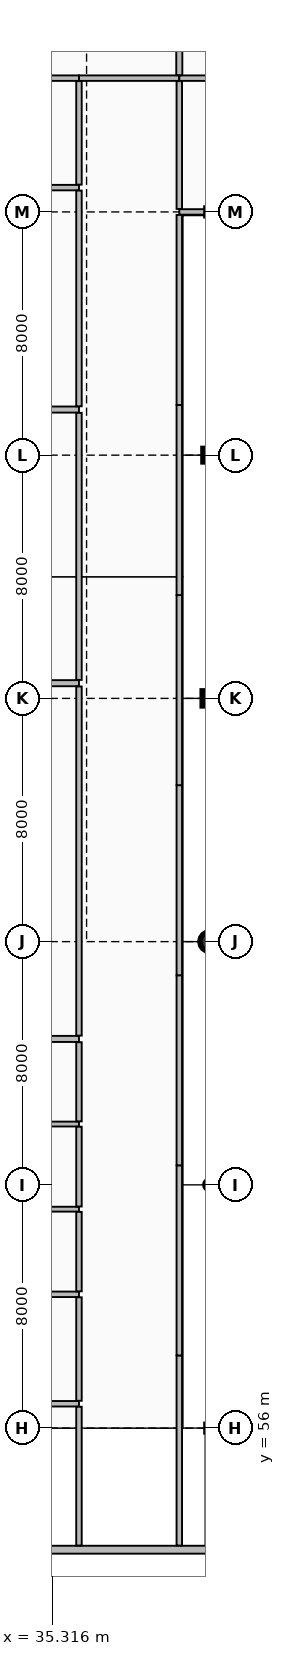
"""IFC4 building model, lengths in metres.
Left out: names, types, materials, properties, quantities, classifications, styles, units other than length and angle.
Written with IfcOpenShell. Run it as: python <this file> out.ifc"""

import sys

from ifc_helpers import new_model, si_unit, direction, frame, frame_2d, origin, origin_2d, place, context, subcontext, project, spatial, rectangle, circle, hollow_circle, extrude, element, fill, save


model = new_model("IFC4")
c1 = context("Model", 3, precision=1e-05, world=origin(), true_north=direction((0.0, 1.0)))
c2 = subcontext(c1, "Body", "Model", "MODEL_VIEW")
j1 = project(units=[si_unit("LENGTHUNIT", "METRE"), si_unit("PLANEANGLEUNIT", "RADIAN")], contexts=[c1])
p1 = place(None, origin())
s1 = spatial("IfcSite", under=j1, at=p1, CompositionType="ELEMENT")
p2 = place(p1, origin())
s2 = spatial("IfcBuilding", under=s1, at=p2, CompositionType="ELEMENT")
p3 = place(p2, frame((0.0, 0.0, 29.1)))
s3 = spatial("IfcBuildingStorey", under=s2, at=p3, CompositionType="ELEMENT", Elevation=29.1)
p4 = place(p3, frame((40.5, 64.0, 0.0), z_axis=(0.0, 0.0, 1.0), x_axis=(1.0, 0.0, 0.0)))
e1 = element("IfcColumn", 1, at=p4, inside=s3, PredefinedType="COLUMN", context=c2, shape_type="SweptSolid", body=[
    extrude(hollow_circle(Radius=0.162, WallThickness=0.013, at=origin_2d()), origin(), (0.0, 0.0, 1.0), 4.2),
])
p5 = place(p3, frame((40.5, 72.0, 0.0), z_axis=(0.0, 0.0, 1.0), x_axis=(1.0, 0.0, 0.0)))
e2 = element("IfcColumn", 2, at=p5, inside=s3, PredefinedType="COLUMN", context=c2, shape_type="SweptSolid", body=[
    extrude(circle(Radius=0.325, at=origin_2d()), origin(), (0.0, 0.0, 1.0), 4.2),
])
p6 = place(p3, frame((40.5, 80.0, 0.0), z_axis=(0.0, 0.0, 1.0), x_axis=(1.0, 0.0, 0.0)))
e3 = element("IfcColumn", 3, at=p6, inside=s3, PredefinedType="COLUMN", context=c2, shape_type="SweptSolid", body=[
    extrude(rectangle(XDim=0.5, YDim=0.5, at=origin_2d()), origin(), (0.0, 0.0, 1.0), 4.2),
])
p7 = place(p3, frame((40.5, 88.0, 0.0), z_axis=(0.0, 0.0, 1.0), x_axis=(1.0, 0.0, 0.0)))
e4 = element("IfcColumn", 4, at=p7, inside=s3, PredefinedType="COLUMN", context=c2, shape_type="SweptSolid", body=[
    extrude(rectangle(XDim=0.45, YDim=0.45, at=origin_2d()), origin(), (0.0, 0.0, 1.0), 4.2),
])
p8 = place(p3, frame((40.5, 52.0, 0.0), z_axis=(0.0, 0.0, 1.0), x_axis=(0.0, 1.0, 0.0)))
e5 = element("IfcWall", 5, at=p8, inside=s3, PredefinedType="SOLIDWALL", context=c2, shape_type="SweptSolid", body=[
    extrude(rectangle(XDim=3.82, YDim=0.28, at=frame_2d((1.91, 0.0))), origin(), (0.0, 0.0, 1.0), 3.96),
])
p9 = place(p3, frame((28.35, 52.0, 0.0), z_axis=(0.0, 0.0, 1.0), x_axis=(1.0, 0.0, 0.0)))
e6 = element("IfcWall", 6, at=p9, inside=s3, PredefinedType="SOLIDWALL", context=c2, shape_type="SweptSolid", body=[
    extrude(rectangle(XDim=12.15, YDim=0.26, at=frame_2d((6.075, 0.0))), origin(), (0.0, 0.0, 1.0), 3.96),
])
p10 = place(p9, frame((5.4, 0.0, 0.85)))
e7 = element("IfcOpeningElement", 7, at=p10, cuts=e6, PredefinedType="OPENING", context=c2, shape_type="SweptSolid", body=[
    extrude(rectangle(XDim=0.9, YDim=2.4, at=frame_2d((0.45, 1.2))), frame((0.0, 0.14, 0.0), z_axis=(0.0, -1.0, 0.0), x_axis=(1.0, 0.0, 0.0)), (0.0, 0.0, 1.0), 0.28),
])
for number, where, z_axis, x_axis in (
    (8, (29.579, 80.5, 0.0), (0.0, 0.0, 1.0), (1.0, 0.0, 0.0)),
    (9, (29.579, 89.5, 0.0), (0.0, 0.0, 1.0), (1.0, 0.0, 0.0)),
):
    element("IfcWall", number, at=place(p3, frame(where, z_axis=z_axis, x_axis=x_axis)), inside=s3, PredefinedType="PARTITIONING", context=c2, shape_type="SweptSolid", body=[
        extrude(rectangle(XDim=6.621, YDim=0.2, at=frame_2d((3.31, 0.0))), origin(), (0.0, 0.0, 1.0), 3.96),
    ])
p11 = place(p3, frame((29.2, 96.8, 0.0), z_axis=(0.0, 0.0, 1.0), x_axis=(1.0, 0.0, 0.0)))
e10 = element("IfcWall", 10, at=p11, inside=s3, PredefinedType="PARTITIONING", context=c2, shape_type="SweptSolid", body=[
    extrude(rectangle(XDim=7.0, YDim=0.18, at=frame_2d((3.5, 0.0))), origin(), (0.0, 0.0, 1.0), 3.96),
])
p12 = place(p3, frame((29.425, 100.4, 0.0), z_axis=(0.0, 0.0, 1.0), x_axis=(1.0, 0.0, 0.0)))
e11 = element("IfcWall", 11, at=p12, inside=s3, PredefinedType="PARTITIONING", context=c2, shape_type="SweptSolid", body=[
    extrude(rectangle(XDim=6.775, YDim=0.18, at=frame_2d((3.387, 0.0))), origin(), (0.0, 0.0, 1.0), 3.96),
])
p13 = place(p12, frame((2.913, 0.0, 0.0)))
e12 = element("IfcOpeningElement", 12, at=p13, cuts=e11, PredefinedType="OPENING", context=c2, shape_type="SweptSolid", body=[
    extrude(rectangle(XDim=0.95, YDim=2.15, at=frame_2d((0.475, 1.075))), frame((0.0, 0.1, 0.0), z_axis=(0.0, -1.0, 0.0), x_axis=(1.0, 0.0, 0.0)), (0.0, 0.0, 1.0), 0.2),
])
p14 = place(p3, frame((31.8, 56.8, 0.0), z_axis=(0.0, 0.0, 1.0), x_axis=(1.0, 0.0, 0.0)))
e13 = element("IfcWall", 13, at=p14, inside=s3, PredefinedType="PARTITIONING", context=c2, shape_type="SweptSolid", body=[
    extrude(rectangle(XDim=4.4, YDim=0.18, at=frame_2d((2.2, 0.0))), origin(), (0.0, 0.0, 1.0), 3.96),
])
p15 = place(p3, frame((32.025, 60.4, 0.0), z_axis=(0.0, 0.0, 1.0), x_axis=(1.0, 0.0, 0.0)))
e14 = element("IfcWall", 14, at=p15, inside=s3, PredefinedType="PARTITIONING", context=c2, shape_type="SweptSolid", body=[
    extrude(rectangle(XDim=4.175, YDim=0.18, at=frame_2d((2.087, 0.0))), origin(), (0.0, 0.0, 1.0), 3.96),
])
for number, where, z_axis, x_axis in (
    (15, (32.033, 63.2, 0.0), (0.0, 0.0, 1.0), (1.0, 0.0, 0.0)),
    (16, (32.033, 66.0, 0.0), (0.0, 0.0, 1.0), (1.0, 0.0, 0.0)),
):
    element("IfcWall", number, at=place(p3, frame(where, z_axis=z_axis, x_axis=x_axis)), inside=s3, PredefinedType="PARTITIONING", context=c2, shape_type="SweptSolid", body=[
        extrude(rectangle(XDim=4.167, YDim=0.16, at=frame_2d((2.083, 0.0))), origin(), (0.0, 0.0, 1.0), 3.96),
    ])
p16 = place(p3, frame((32.025, 68.8, 0.0), z_axis=(0.0, 0.0, 1.0), x_axis=(1.0, 0.0, 0.0)))
e17 = element("IfcWall", 17, at=p16, inside=s3, PredefinedType="PARTITIONING", context=c2, shape_type="SweptSolid", body=[
    extrude(rectangle(XDim=4.175, YDim=0.2, at=frame_2d((2.087, 0.0))), origin(), (0.0, 0.0, 1.0), 3.96),
])
p17 = place(p3, frame((36.2, 100.4, 0.0), z_axis=(0.0, 0.0, 1.0), x_axis=(1.0, 0.0, 0.0)))
e18 = element("IfcWall", 18, at=p17, inside=s3, PredefinedType="PARTITIONING", context=c2, shape_type="SweptSolid", body=[
    extrude(rectangle(XDim=3.3, YDim=0.18, at=frame_2d((1.65, 0.0))), origin(), (0.0, 0.0, 1.0), 3.96),
])
p18 = place(p3, frame((39.5, 96.0, 0.0), z_axis=(0.0, 0.0, 1.0), x_axis=(1.0, 0.0, 0.0)))
e19 = element("IfcWall", 19, at=p18, inside=s3, PredefinedType="PARTITIONING", context=c2, shape_type="SweptSolid", body=[
    extrude(rectangle(XDim=0.862, YDim=0.18, at=frame_2d((0.431, 0.0))), origin(), (0.0, 0.0, 1.0), 3.402),
])
p19 = place(p3, frame((39.5, 100.4, 0.0), z_axis=(0.0, 0.0, 1.0), x_axis=(1.0, 0.0, 0.0)))
e20 = element("IfcWall", 20, at=p19, inside=s3, PredefinedType="PARTITIONING", context=c2, shape_type="SweptSolid", body=[
    extrude(rectangle(XDim=4.1, YDim=0.18, at=frame_2d((2.05, 0.0))), origin(), (0.0, 0.0, 1.0), 3.96),
])
p20 = place(p3, frame((36.2, 52.138, 0.0), z_axis=(0.0, 0.0, 1.0), x_axis=(0.0, 1.0, 0.0)))
e21 = element("IfcWall", 21, at=p20, inside=s3, PredefinedType="PARTITIONING", context=c2, shape_type="SweptSolid", body=[
    extrude(rectangle(XDim=4.564, YDim=0.18, at=frame_2d((2.282, 0.0))), origin(), (0.0, 0.0, 1.0), 3.96),
])
p21 = place(p20, frame((1.732, 0.0, 0.0)))
e22 = element("IfcOpeningElement", 22, at=p21, cuts=e21, PredefinedType="OPENING", context=c2, shape_type="SweptSolid", body=[
    extrude(rectangle(XDim=1.1, YDim=2.2, at=frame_2d((0.55, 1.1))), frame((0.0, 0.1, 0.0), z_axis=(0.0, -1.0, 0.0), x_axis=(1.0, 0.0, 0.0)), (0.0, 0.0, 1.0), 0.2),
])
p22 = place(p3, frame((36.2, 56.898, 0.0), z_axis=(0.0, 0.0, 1.0), x_axis=(0.0, 1.0, 0.0)))
e23 = element("IfcWall", 23, at=p22, inside=s3, PredefinedType="PARTITIONING", context=c2, shape_type="SweptSolid", body=[
    extrude(rectangle(XDim=3.404, YDim=0.18, at=frame_2d((1.702, 0.0))), origin(), (0.0, 0.0, 1.0), 3.96),
])
p23 = place(p22, frame((1.202, 0.0, 0.0)))
e24 = element("IfcOpeningElement", 24, at=p23, cuts=e23, PredefinedType="OPENING", context=c2, shape_type="SweptSolid", body=[
    extrude(rectangle(XDim=1.0, YDim=2.15, at=frame_2d((0.5, 1.075))), frame((0.0, 0.1, 0.0), z_axis=(0.0, -1.0, 0.0), x_axis=(1.0, 0.0, 0.0)), (0.0, 0.0, 1.0), 0.2),
])
p24 = place(p3, frame((36.2, 60.498, 0.0), z_axis=(0.0, 0.0, 1.0), x_axis=(0.0, 1.0, 0.0)))
e25 = element("IfcWall", 25, at=p24, inside=s3, PredefinedType="PARTITIONING", context=c2, shape_type="SweptSolid", body=[
    extrude(rectangle(XDim=2.614, YDim=0.18, at=frame_2d((1.307, 0.0))), origin(), (0.0, 0.0, 1.0), 3.96),
])
p25 = place(p24, frame((0.832, 0.0, 0.0)))
e26 = element("IfcOpeningElement", 26, at=p25, cuts=e25, PredefinedType="OPENING", context=c2, shape_type="SweptSolid", body=[
    extrude(rectangle(XDim=0.95, YDim=2.1, at=frame_2d((0.475, 1.05))), frame((0.0, 0.1, 0.0), z_axis=(0.0, -1.0, 0.0), x_axis=(1.0, 0.0, 0.0)), (0.0, 0.0, 1.0), 0.2),
])
p26 = place(p3, frame((36.2, 63.288, 0.0), z_axis=(0.0, 0.0, 1.0), x_axis=(0.0, 1.0, 0.0)))
e27 = element("IfcWall", 27, at=p26, inside=s3, PredefinedType="PARTITIONING", context=c2, shape_type="SweptSolid", body=[
    extrude(rectangle(XDim=2.624, YDim=0.18, at=frame_2d((1.312, 0.0))), origin(), (0.0, 0.0, 1.0), 3.96),
])
p27 = place(p26, frame((0.837, 0.0, 0.0)))
e28 = element("IfcOpeningElement", 28, at=p27, cuts=e27, PredefinedType="OPENING", context=c2, shape_type="SweptSolid", body=[
    extrude(rectangle(XDim=0.95, YDim=2.1, at=frame_2d((0.475, 1.05))), frame((0.0, 0.1, 0.0), z_axis=(0.0, -1.0, 0.0), x_axis=(1.0, 0.0, 0.0)), (0.0, 0.0, 1.0), 0.2),
])
p28 = place(p3, frame((36.2, 66.088, 0.0), z_axis=(0.0, 0.0, 1.0), x_axis=(0.0, 1.0, 0.0)))
e29 = element("IfcWall", 29, at=p28, inside=s3, PredefinedType="PARTITIONING", context=c2, shape_type="SweptSolid", body=[
    extrude(rectangle(XDim=2.604, YDim=0.18, at=frame_2d((1.302, 0.0))), origin(), (0.0, 0.0, 1.0), 3.96),
])
p29 = place(p28, frame((0.802, 0.0, 0.0)))
e30 = element("IfcOpeningElement", 30, at=p29, cuts=e29, PredefinedType="OPENING", context=c2, shape_type="SweptSolid", body=[
    extrude(rectangle(XDim=1.0, YDim=2.15, at=frame_2d((0.5, 1.075))), frame((0.0, 0.1, 0.0), z_axis=(0.0, -1.0, 0.0), x_axis=(1.0, 0.0, 0.0)), (0.0, 0.0, 1.0), 0.2),
])
p30 = place(p3, frame((36.2, 68.908, 0.0), z_axis=(0.0, 0.0, 1.0), x_axis=(0.0, 1.0, 0.0)))
e31 = element("IfcWall", 31, at=p30, inside=s3, PredefinedType="PARTITIONING", context=c2, shape_type="SweptSolid", body=[
    extrude(rectangle(XDim=11.484, YDim=0.18, at=frame_2d((5.742, 0.0))), origin(), (0.0, 0.0, 1.0), 3.598),
])
p31 = place(p30, frame((5.192, 0.0, 0.0)))
e32 = element("IfcOpeningElement", 32, at=p31, cuts=e31, PredefinedType="OPENING", context=c2, shape_type="SweptSolid", body=[
    extrude(rectangle(XDim=1.1, YDim=2.2, at=frame_2d((0.55, 1.1))), frame((0.0, 0.1, 0.0), z_axis=(0.0, -1.0, 0.0), x_axis=(1.0, 0.0, 0.0)), (0.0, 0.0, 1.0), 0.2),
])
p32 = place(p3, frame((36.2, 80.608, 0.0), z_axis=(0.0, 0.0, 1.0), x_axis=(0.0, 1.0, 0.0)))
e33 = element("IfcWall", 33, at=p32, inside=s3, PredefinedType="PARTITIONING", context=c2, shape_type="SweptSolid", body=[
    extrude(rectangle(XDim=8.784, YDim=0.18, at=frame_2d((4.392, 0.0))), origin(), (0.0, 0.0, 1.0), 3.545),
])
p33 = place(p32, frame((3.892, 0.0, 0.0)))
e34 = element("IfcOpeningElement", 34, at=p33, cuts=e33, PredefinedType="OPENING", context=c2, shape_type="SweptSolid", body=[
    extrude(rectangle(XDim=1.0, YDim=2.2, at=frame_2d((0.5, 1.1))), frame((0.0, 0.1, 0.0), z_axis=(0.0, -1.0, 0.0), x_axis=(1.0, 0.0, 0.0)), (0.0, 0.0, 1.0), 0.2),
])
p34 = place(p3, frame((36.2, 89.608, 0.0), z_axis=(0.0, 0.0, 1.0), x_axis=(0.0, 1.0, 0.0)))
e35 = element("IfcWall", 35, at=p34, inside=s3, PredefinedType="PARTITIONING", context=c2, shape_type="SweptSolid", body=[
    extrude(rectangle(XDim=7.094, YDim=0.18, at=frame_2d((3.547, 0.0))), origin(), (0.0, 0.0, 1.0), 3.545),
])
p35 = place(p34, frame((3.047, 0.0, 0.0)))
e36 = element("IfcOpeningElement", 36, at=p35, cuts=e35, PredefinedType="OPENING", context=c2, shape_type="SweptSolid", body=[
    extrude(rectangle(XDim=1.0, YDim=2.2, at=frame_2d((0.5, 1.1))), frame((0.0, 0.1, 0.0), z_axis=(0.0, -1.0, 0.0), x_axis=(1.0, 0.0, 0.0)), (0.0, 0.0, 1.0), 0.2),
])
p36 = place(p3, frame((36.2, 96.898, 0.0), z_axis=(0.0, 0.0, 1.0), x_axis=(0.0, 1.0, 0.0)))
e37 = element("IfcWall", 37, at=p36, inside=s3, PredefinedType="PARTITIONING", context=c2, shape_type="SweptSolid", body=[
    extrude(rectangle(XDim=3.404, YDim=0.18, at=frame_2d((1.702, 0.0))), origin(), (0.0, 0.0, 1.0), 3.545),
])
p37 = place(p36, frame((1.152, 0.0, 0.0)))
e38 = element("IfcOpeningElement", 38, at=p37, cuts=e37, PredefinedType="OPENING", context=c2, shape_type="SweptSolid", body=[
    extrude(rectangle(XDim=1.1, YDim=2.2, at=frame_2d((0.55, 1.1))), frame((0.0, 0.1, 0.0), z_axis=(0.0, -1.0, 0.0), x_axis=(1.0, 0.0, 0.0)), (0.0, 0.0, 1.0), 0.2),
])
p38 = place(p3, frame((39.5, 52.138, 0.0), z_axis=(0.0, 0.0, 1.0), x_axis=(0.0, 1.0, 0.0)))
e39 = element("IfcWall", 39, at=p38, inside=s3, PredefinedType="PARTITIONING", context=c2, shape_type="SweptSolid", body=[
    extrude(rectangle(XDim=6.252, YDim=0.18, at=frame_2d((3.126, 0.0))), origin(), (0.0, 0.0, 1.0), 3.96),
])
p39 = place(p3, frame((39.5, 58.39, 0.0), z_axis=(0.0, 0.0, 1.0), x_axis=(0.0, 1.0, 0.0)))
e40 = element("IfcWall", 40, at=p39, inside=s3, PredefinedType="PARTITIONING", context=c2, shape_type="SweptSolid", body=[
    extrude(rectangle(XDim=6.252, YDim=0.18, at=frame_2d((3.126, 0.0))), origin(), (0.0, 0.0, 1.0), 3.96),
])
for number, where, z_axis, x_axis in (
    (41, (39.5, 64.642, 0.0), (0.0, 0.0, 1.0), (0.0, 1.0, 0.0)),
    (42, (39.5, 70.894, 0.0), (0.0, 0.0, 1.0), (0.0, 1.0, 0.0)),
    (43, (39.5, 77.146, 0.0), (0.0, 0.0, 1.0), (0.0, 1.0, 0.0)),
    (44, (39.5, 83.398, 0.0), (0.0, 0.0, 1.0), (0.0, 1.0, 0.0)),
):
    element("IfcWall", number, at=place(p3, frame(where, z_axis=z_axis, x_axis=x_axis)), inside=s3, PredefinedType="PARTITIONING", context=c2, shape_type="SweptSolid", body=[
        extrude(rectangle(XDim=6.252, YDim=0.18, at=frame_2d((3.126, 0.0))), origin(), (0.0, 0.0, 1.0), 3.96),
    ])
p40 = place(p3, frame((39.5, 89.65, 0.0), z_axis=(0.0, 0.0, 1.0), x_axis=(0.0, 1.0, 0.0)))
e45 = element("IfcWall", 45, at=p40, inside=s3, PredefinedType="PARTITIONING", context=c2, shape_type="SweptSolid", body=[
    extrude(rectangle(XDim=6.252, YDim=0.18, at=frame_2d((3.126, 0.0))), origin(), (0.0, 0.0, 1.0), 3.96),
])
p41 = place(p3, frame((39.5, 96.098, 0.0), z_axis=(0.0, 0.0, 1.0), x_axis=(0.0, 1.0, 0.0)))
e46 = element("IfcWall", 46, at=p41, inside=s3, PredefinedType="PARTITIONING", context=c2, shape_type="SweptSolid", body=[
    extrude(rectangle(XDim=4.204, YDim=0.18, at=frame_2d((2.102, 0.0))), origin(), (0.0, 0.0, 1.0), 3.96),
])
p42 = place(p41, frame((1.502, 0.0, 0.0)))
e47 = element("IfcOpeningElement", 47, at=p42, cuts=e46, PredefinedType="OPENING", context=c2, shape_type="SweptSolid", body=[
    extrude(rectangle(XDim=1.2, YDim=2.2, at=frame_2d((0.6, 1.1))), frame((0.0, 0.1, 0.0), z_axis=(0.0, -1.0, 0.0), x_axis=(1.0, 0.0, 0.0)), (0.0, 0.0, 1.0), 0.2),
])
p43 = place(p3, frame((39.5, 100.498, 0.0), z_axis=(0.0, 0.0, 1.0), x_axis=(0.0, 1.0, 0.0)))
e48 = element("IfcWall", 48, at=p43, inside=s3, PredefinedType="PARTITIONING", context=c2, shape_type="SweptSolid", body=[
    extrude(rectangle(XDim=5.682, YDim=0.2, at=frame_2d((2.841, 0.0))), origin(), (0.0, 0.0, 1.0), 3.96),
])
p44 = place(p21, origin())
e49 = element("IfcDoor", 49, at=p44, inside=s3, OperationType="SINGLE_SWING_RIGHT", PredefinedType="DOOR", context=c2, shape_type="SweptSolid", body=[
    extrude(rectangle(XDim=1.1, YDim=2.2, at=frame_2d((0.55, 1.1))), frame((0.0, 0.025, 0.0), z_axis=(0.0, -1.0, 0.0), x_axis=(1.0, 0.0, 0.0)), (0.0, 0.0, 1.0), 0.05),
])
fill(e22, e49)
p45 = place(p23, origin())
e50 = element("IfcDoor", 50, at=p45, inside=s3, OperationType="SINGLE_SWING_LEFT", PredefinedType="DOOR", context=c2, shape_type="SweptSolid", body=[
    extrude(rectangle(XDim=1.0, YDim=2.15, at=frame_2d((0.5, 1.075))), frame((0.0, 0.025, 0.0), z_axis=(0.0, -1.0, 0.0), x_axis=(1.0, 0.0, 0.0)), (0.0, 0.0, 1.0), 0.05),
])
fill(e24, e50)
p46 = place(p25, origin())
e51 = element("IfcDoor", 51, at=p46, inside=s3, OperationType="SINGLE_SWING_RIGHT", PredefinedType="DOOR", context=c2, shape_type="SweptSolid", body=[
    extrude(rectangle(XDim=0.95, YDim=2.1, at=frame_2d((0.475, 1.05))), frame((0.0, 0.025, 0.0), z_axis=(0.0, -1.0, 0.0), x_axis=(1.0, 0.0, 0.0)), (0.0, 0.0, 1.0), 0.05),
])
fill(e26, e51)
p47 = place(p27, origin())
e52 = element("IfcDoor", 52, at=p47, inside=s3, OperationType="SINGLE_SWING_LEFT", PredefinedType="DOOR", context=c2, shape_type="SweptSolid", body=[
    extrude(rectangle(XDim=0.95, YDim=2.1, at=frame_2d((0.475, 1.05))), frame((0.0, 0.025, 0.0), z_axis=(0.0, -1.0, 0.0), x_axis=(1.0, 0.0, 0.0)), (0.0, 0.0, 1.0), 0.05),
])
fill(e28, e52)
p48 = place(p29, origin())
e53 = element("IfcDoor", 53, at=p48, inside=s3, OperationType="SINGLE_SWING_RIGHT", PredefinedType="DOOR", context=c2, shape_type="SweptSolid", body=[
    extrude(rectangle(XDim=1.0, YDim=2.15, at=frame_2d((0.5, 1.075))), frame((0.0, 0.025, 0.0), z_axis=(0.0, -1.0, 0.0), x_axis=(1.0, 0.0, 0.0)), (0.0, 0.0, 1.0), 0.05),
])
fill(e30, e53)
p49 = place(p31, origin())
e54 = element("IfcDoor", 54, at=p49, inside=s3, OperationType="SINGLE_SWING_LEFT", PredefinedType="DOOR", context=c2, shape_type="SweptSolid", body=[
    extrude(rectangle(XDim=1.1, YDim=2.2, at=frame_2d((0.55, 1.1))), frame((0.0, 0.025, 0.0), z_axis=(0.0, -1.0, 0.0), x_axis=(1.0, 0.0, 0.0)), (0.0, 0.0, 1.0), 0.05),
])
fill(e32, e54)
p50 = place(p33, origin())
e55 = element("IfcDoor", 55, at=p50, inside=s3, OperationType="SINGLE_SWING_RIGHT", PredefinedType="DOOR", context=c2, shape_type="SweptSolid", body=[
    extrude(rectangle(XDim=1.0, YDim=2.2, at=frame_2d((0.5, 1.1))), frame((0.0, 0.025, 0.0), z_axis=(0.0, -1.0, 0.0), x_axis=(1.0, 0.0, 0.0)), (0.0, 0.0, 1.0), 0.05),
])
fill(e34, e55)
p51 = place(p35, origin())
e56 = element("IfcDoor", 56, at=p51, inside=s3, OperationType="SINGLE_SWING_LEFT", PredefinedType="DOOR", context=c2, shape_type="SweptSolid", body=[
    extrude(rectangle(XDim=1.0, YDim=2.2, at=frame_2d((0.5, 1.1))), frame((0.0, 0.025, 0.0), z_axis=(0.0, -1.0, 0.0), x_axis=(1.0, 0.0, 0.0)), (0.0, 0.0, 1.0), 0.05),
])
fill(e36, e56)
p52 = place(p37, origin())
e57 = element("IfcDoor", 57, at=p52, inside=s3, OperationType="SINGLE_SWING_RIGHT", PredefinedType="DOOR", context=c2, shape_type="SweptSolid", body=[
    extrude(rectangle(XDim=1.1, YDim=2.2, at=frame_2d((0.55, 1.1))), frame((0.0, 0.025, 0.0), z_axis=(0.0, -1.0, 0.0), x_axis=(1.0, 0.0, 0.0)), (0.0, 0.0, 1.0), 0.05),
])
fill(e38, e57)
p53 = place(p42, frame((1.2, 0.0, 0.0), z_axis=(0.0, 0.0, 1.0), x_axis=(-1.0, 0.0, 0.0)))
e58 = element("IfcDoor", 58, at=p53, inside=s3, OperationType="SINGLE_SWING_LEFT", PredefinedType="DOOR", context=c2, shape_type="SweptSolid", body=[
    extrude(rectangle(XDim=1.2, YDim=2.2, at=frame_2d((0.6, 1.1))), frame((0.0, 0.025, 0.0), z_axis=(0.0, -1.0, 0.0), x_axis=(1.0, 0.0, 0.0)), (0.0, 0.0, 1.0), 0.05),
])
fill(e47, e58)
save(model, sys.argv[1])
